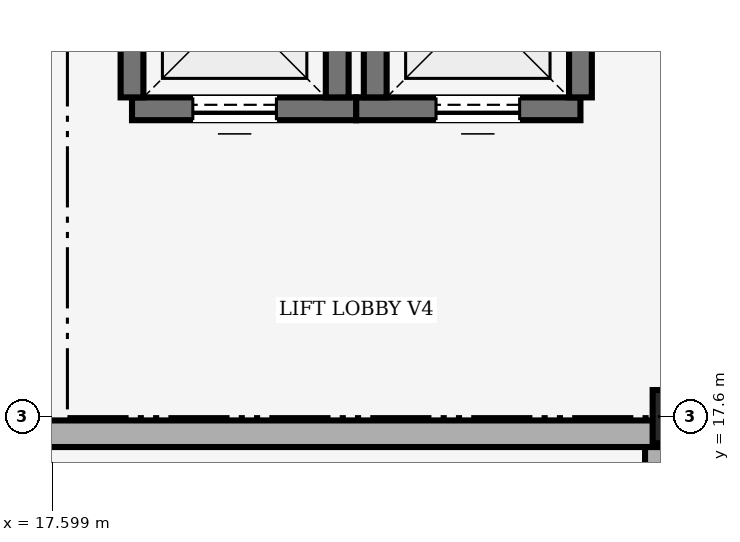
"""IFC4 building model, lengths in metres.
Left out: names, types, materials, properties, quantities, classifications, styles, units other than length and angle.
Written with IfcOpenShell. Run it as: python <this file> out.ifc"""

import sys

from ifc_helpers import new_model, si_unit, direction, frame, frame_2d, origin, origin_2d, place, context, subcontext, project, spatial, rectangle, extrude, element, fill, save


model = new_model("IFC4")
c1 = context("Model", 3, precision=1e-05, world=origin(), true_north=direction((0.0, 1.0)))
c2 = subcontext(c1, "Body", "Model", "MODEL_VIEW")
j1 = project(units=[si_unit("LENGTHUNIT", "METRE"), si_unit("PLANEANGLEUNIT", "RADIAN")], contexts=[c1])
p1 = place(None, origin())
s1 = spatial("IfcSite", under=j1, at=p1, CompositionType="ELEMENT")
p2 = place(p1, origin())
s2 = spatial("IfcBuilding", under=s1, at=p2, CompositionType="ELEMENT")
p3 = place(p2, frame((0.0, 0.0, 19.05)))
s3 = spatial("IfcBuildingStorey", under=s2, at=p3, CompositionType="ELEMENT", Elevation=19.05)
p4 = place(p3, frame((25.8, 17.6, 0.0), z_axis=(0.0, 0.0, 1.0), x_axis=(1.0, 0.0, 0.0)))
e1 = element("IfcColumn", 1, at=p4, inside=s3, PredefinedType="COLUMN", context=c2, shape_type="SweptSolid", body=[
    extrude(rectangle(XDim=0.6, YDim=0.7, at=origin_2d()), origin(), (0.0, 0.0, 1.0), 3.06),
])
p5 = place(p3, frame((21.6, 21.65, 0.0), z_axis=(0.0, 0.0, 1.0), x_axis=(-1.0, 0.0, 0.0)))
e2 = element("IfcWall", 2, at=p5, inside=s3, PredefinedType="SHEAR", context=c2, shape_type="SweptSolid", body=[
    extrude(rectangle(XDim=2.95, YDim=0.3, at=frame_2d((1.475, 0.0))), origin(), (0.0, 0.0, 1.0), 3.06),
])
p6 = place(p5, frame((1.05, 0.0, 0.0)))
e3 = element("IfcOpeningElement", 3, at=p6, cuts=e2, PredefinedType="OPENING", context=c2, shape_type="SweptSolid", body=[
    extrude(rectangle(XDim=1.1, YDim=2.1, at=frame_2d((0.55, 1.05))), frame((0.0, 0.15, 0.0), z_axis=(0.0, -1.0, 0.0), x_axis=(1.0, 0.0, 0.0)), (0.0, 0.0, 1.0), 0.3),
])
for number, where, z_axis, x_axis in (
    (4, (18.65, 21.8, 0.0), (0.0, 0.0, 1.0), (0.0, 1.0, 0.0)),
    (5, (21.35, 24.2, 0.0), (0.0, 0.0, 1.0), (0.0, -1.0, 0.0)),
):
    element("IfcWall", number, at=place(p3, frame(where, z_axis=z_axis, x_axis=x_axis)), inside=s3, PredefinedType="SHEAR", context=c2, shape_type="SweptSolid", body=[
        extrude(rectangle(XDim=2.4, YDim=0.3, at=frame_2d((1.2, 0.0))), origin(), (0.0, 0.0, 1.0), 3.06),
    ])
p7 = place(p3, frame((24.55, 21.65, 0.0), z_axis=(0.0, 0.0, 1.0), x_axis=(-1.0, 0.0, 0.0)))
e6 = element("IfcWall", 6, at=p7, inside=s3, PredefinedType="SHEAR", context=c2, shape_type="SweptSolid", body=[
    extrude(rectangle(XDim=2.95, YDim=0.3, at=frame_2d((1.475, 0.0))), origin(), (0.0, 0.0, 1.0), 3.06),
])
p8 = place(p7, frame((0.8, 0.0, 0.0)))
e7 = element("IfcOpeningElement", 7, at=p8, cuts=e6, PredefinedType="OPENING", context=c2, shape_type="SweptSolid", body=[
    extrude(rectangle(XDim=1.1, YDim=2.1, at=frame_2d((0.55, 1.05))), frame((0.0, 0.15, 0.0), z_axis=(0.0, -1.0, 0.0), x_axis=(1.0, 0.0, 0.0)), (0.0, 0.0, 1.0), 0.3),
])
for number, where, z_axis, x_axis in (
    (8, (21.85, 21.8, 0.0), (0.0, 0.0, 1.0), (0.0, 1.0, 0.0)),
    (9, (24.55, 24.2, 0.0), (0.0, 0.0, 1.0), (0.0, -1.0, 0.0)),
):
    element("IfcWall", number, at=place(p3, frame(where, z_axis=z_axis, x_axis=x_axis)), inside=s3, PredefinedType="SHEAR", context=c2, shape_type="SweptSolid", body=[
        extrude(rectangle(XDim=2.4, YDim=0.3, at=frame_2d((1.2, 0.0))), origin(), (0.0, 0.0, 1.0), 3.06),
    ])
p9 = place(p3, frame((9.425, 17.375, 0.0), z_axis=(0.0, 0.0, 1.0), x_axis=(1.0, 0.0, 0.0)))
e10 = element("IfcWall", 10, at=p9, inside=s3, PredefinedType="SOLIDWALL", context=c2, shape_type="SweptSolid", body=[
    extrude(rectangle(XDim=16.15, YDim=0.35, at=frame_2d((8.075, 0.0))), origin(), (0.0, 0.0, 1.0), 2.44),
])
p10 = place(p9, frame((3.075, 0.0, 0.0)))
e11 = element("IfcOpeningElement", 11, at=p10, cuts=e10, PredefinedType="OPENING", context=c2, shape_type="SweptSolid", body=[
    extrude(rectangle(XDim=2.0, YDim=2.25, at=frame_2d((1.0, 1.125))), frame((0.0, 0.175, 0.0), z_axis=(0.0, -1.0, 0.0), x_axis=(1.0, 0.0, 0.0)), (0.0, 0.0, 1.0), 0.35),
])
p11 = place(p3, frame((25.575, 17.2, 0.0), z_axis=(0.0, 0.0, 1.0), x_axis=(0.0, -1.0, 0.0)))
e12 = element("IfcWall", 12, at=p11, inside=s3, PredefinedType="SOLIDWALL", context=c2, shape_type="SweptSolid", body=[
    extrude(rectangle(XDim=16.8, YDim=0.35, at=frame_2d((8.4, 0.0))), origin(), (0.0, 0.0, 1.0), 2.44),
])
p12 = place(p6, origin())
e13 = element("IfcDoor", 13, at=p12, inside=s3, OperationType="SLIDING_TO_LEFT", PredefinedType="DOOR", context=c2, shape_type="SweptSolid", body=[
    extrude(rectangle(XDim=1.1, YDim=2.1, at=frame_2d((0.55, 1.05))), frame((0.0, 0.025, 0.0), z_axis=(0.0, -1.0, 0.0), x_axis=(1.0, 0.0, 0.0)), (0.0, 0.0, 1.0), 0.05),
])
fill(e3, e13)
p13 = place(p8, origin())
e14 = element("IfcDoor", 14, at=p13, inside=s3, OperationType="SLIDING_TO_LEFT", PredefinedType="DOOR", context=c2, shape_type="SweptSolid", body=[
    extrude(rectangle(XDim=1.1, YDim=2.1, at=frame_2d((0.55, 1.05))), frame((0.0, 0.025, 0.0), z_axis=(0.0, -1.0, 0.0), x_axis=(1.0, 0.0, 0.0)), (0.0, 0.0, 1.0), 0.05),
])
fill(e7, e14)
save(model, sys.argv[1])
